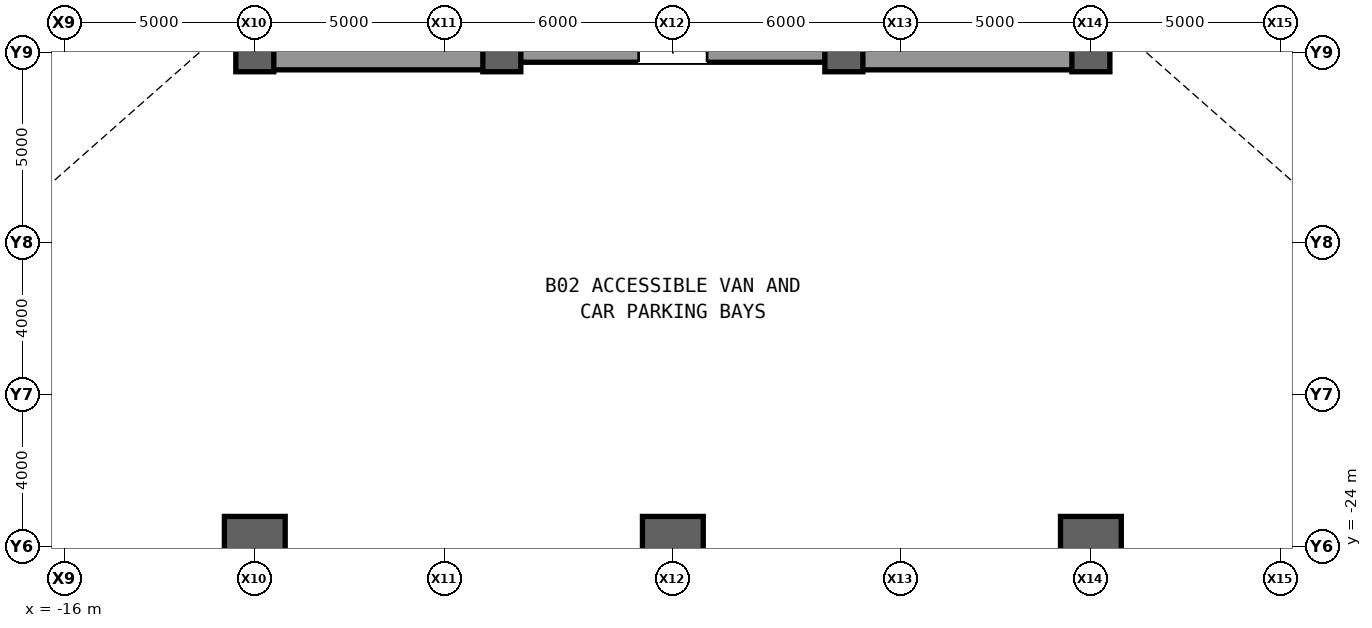
"""IFC4 building model, lengths in metres.
Left out: names, types, materials, properties, quantities, classifications, styles, units other than length and angle.
Written with IfcOpenShell. Run it as: python <this file> out.ifc"""

import sys

from ifc_helpers import new_model, si_unit, direction, frame, frame_2d, origin, origin_2d, place, context, subcontext, project, spatial, rectangle, extrude, source, transform, mapped, element, fill, save


model = new_model("IFC4")
c1 = context("Model", 3, precision=1e-05, world=origin(), true_north=direction((0.0, 1.0)))
c2 = subcontext(c1, "Body", "Model", "MODEL_VIEW")
j1 = project(units=[si_unit("LENGTHUNIT", "METRE"), si_unit("PLANEANGLEUNIT", "RADIAN")], contexts=[c1])
p1 = place(None, origin())
s1 = spatial("IfcSite", under=j1, at=p1, CompositionType="ELEMENT")
p2 = place(p1, origin())
s2 = spatial("IfcBuilding", under=s1, at=p2, CompositionType="ELEMENT")
p3 = place(p2, frame((0.0, 0.0, -9.6)))
s3 = spatial("IfcBuildingStorey", under=s2, at=p3, CompositionType="ELEMENT", Elevation=-9.6)
m1 = source(origin(), c2, "Body", "SweptSolid", [
    extrude(rectangle(XDim=22.0, YDim=0.6, at=frame_2d((11.0, 0.0))), origin(), (0.0, 0.0, 1.0), 4.48),
])
p4 = place(p3, frame((-11.0, -11.0, 0.0), z_axis=(0.0, 0.0, 1.0), x_axis=(0.0, 1.0, 0.0)))
e1 = element("IfcWall", 1, at=p4, inside=s3, PredefinedType="SHEAR", context=c2, shape_type="MappedRepresentation", body=[
    mapped(m1, transform((0.0, 0.0, 0.0), scale=1.0)),
])
m2 = source(origin(), c2, "Body", "SweptSolid", [
    extrude(rectangle(XDim=1.1, YDim=2.2, at=frame_2d((0.55, 1.1))), frame((0.0, 0.31, 0.0), z_axis=(0.0, -1.0, 0.0), x_axis=(1.0, 0.0, 0.0)), (0.0, 0.0, 1.0), 0.62),
])
p5 = place(p4, frame((0.8, 0.0, 0.0)))
e2 = element("IfcOpeningElement", 2, at=p5, cuts=e1, PredefinedType="OPENING", context=c2, shape_type="MappedRepresentation", body=[
    mapped(m2, transform((0.0, 0.0, 0.0), scale=1.0)),
])
p6 = place(p4, frame((12.5, 0.0, 0.0)))
e3 = element("IfcOpeningElement", 3, at=p6, cuts=e1, PredefinedType="OPENING", context=c2, shape_type="MappedRepresentation", body=[
    mapped(m2, transform((0.0, 0.0, 0.0), scale=1.0)),
])
m3 = source(origin(), c2, "Body", "SweptSolid", [
    extrude(rectangle(XDim=0.9, YDim=2.15, at=frame_2d((0.45, 1.075))), frame((0.0, 0.31, 0.0), z_axis=(0.0, -1.0, 0.0), x_axis=(1.0, 0.0, 0.0)), (0.0, 0.0, 1.0), 0.62),
])
p7 = place(p4, frame((6.2, 0.0, 0.0)))
e4 = element("IfcOpeningElement", 4, at=p7, cuts=e1, PredefinedType="OPENING", context=c2, shape_type="MappedRepresentation", body=[
    mapped(m3, transform((0.0, 0.0, 0.0), scale=1.0)),
])
p8 = place(p4, frame((8.525, 0.0, 0.0)))
e5 = element("IfcOpeningElement", 5, at=p8, cuts=e1, PredefinedType="OPENING", context=c2, shape_type="MappedRepresentation", body=[
    mapped(m3, transform((0.0, 0.0, 0.0), scale=1.0)),
])
m4 = source(origin(), c2, "Body", "SweptSolid", [
    extrude(rectangle(XDim=1.3, YDim=2.3, at=frame_2d((0.65, 1.15))), frame((0.0, 0.31, 0.0), z_axis=(0.0, -1.0, 0.0), x_axis=(1.0, 0.0, 0.0)), (0.0, 0.0, 1.0), 0.62),
])
p9 = place(p4, frame((2.7, 0.0, 0.0)))
e6 = element("IfcOpeningElement", 6, at=p9, cuts=e1, PredefinedType="OPENING", context=c2, shape_type="MappedRepresentation", body=[
    mapped(m4, transform((0.0, 0.0, 0.0), scale=1.0)),
])
p10 = place(p3, frame((11.0, -11.0, 0.0), z_axis=(0.0, 0.0, 1.0), x_axis=(0.0, 1.0, 0.0)))
e7 = element("IfcWall", 7, at=p10, inside=s3, PredefinedType="SHEAR", context=c2, shape_type="MappedRepresentation", body=[
    mapped(m1, transform((0.0, 0.0, 0.0), scale=1.0)),
])
p11 = place(p10, frame((0.8, 0.0, 0.0)))
e8 = element("IfcOpeningElement", 8, at=p11, cuts=e7, PredefinedType="OPENING", context=c2, shape_type="MappedRepresentation", body=[
    mapped(m2, transform((0.0, 0.0, 0.0), scale=1.0)),
])
p12 = place(p10, frame((6.2, 0.0, 0.0)))
e9 = element("IfcOpeningElement", 9, at=p12, cuts=e7, PredefinedType="OPENING", context=c2, shape_type="MappedRepresentation", body=[
    mapped(m3, transform((0.0, 0.0, 0.0), scale=1.0)),
])
p13 = place(p10, frame((8.525, 0.0, 0.0)))
e10 = element("IfcOpeningElement", 10, at=p13, cuts=e7, PredefinedType="OPENING", context=c2, shape_type="MappedRepresentation", body=[
    mapped(m3, transform((0.0, 0.0, 0.0), scale=1.0)),
])
p14 = place(p10, frame((2.7, 0.0, 0.0)))
e11 = element("IfcOpeningElement", 11, at=p14, cuts=e7, PredefinedType="OPENING", context=c2, shape_type="MappedRepresentation", body=[
    mapped(m4, transform((0.0, 0.0, 0.0), scale=1.0)),
])
p15 = place(p10, frame((13.35, 0.0, 0.0)))
e12 = element("IfcOpeningElement", 12, at=p15, cuts=e7, PredefinedType="OPENING", context=c2, shape_type="MappedRepresentation", body=[
    mapped(m4, transform((0.0, 0.0, 0.0), scale=1.0)),
])
m5 = source(origin(), c2, "Body", "SweptSolid", [
    extrude(rectangle(XDim=5.85, YDim=0.9, at=frame_2d((2.925, 0.0))), origin(), (0.0, 0.0, 1.0), 4.48),
])
for number, where, z_axis, x_axis in (
    (13, (-10.7, -11.0, 0.0), (0.0, 0.0, 1.0), (1.0, 0.0, 0.0)),
    (14, (4.85, -11.0, 0.0), (0.0, 0.0, 1.0), (1.0, 0.0, 0.0)),
):
    element("IfcWall", number, at=place(p3, frame(where, z_axis=z_axis, x_axis=x_axis)), inside=s3, PredefinedType="SHEAR", context=c2, shape_type="MappedRepresentation", body=[
        mapped(m5, transform((0.0, 0.0, 0.0), scale=1.0)),
    ])
m6 = source(origin(), c2, "Body", "SweptSolid", [
    extrude(rectangle(XDim=9.2, YDim=0.5, at=frame_2d((4.6, 0.0))), origin(), (0.0, 0.0, 1.0), 4.48),
])
p16 = place(p3, frame((-4.6, -11.0, 0.0), z_axis=(0.0, 0.0, 1.0), x_axis=(1.0, 0.0, 0.0)))
e15 = element("IfcWall", 15, at=p16, inside=s3, PredefinedType="SHEAR", context=c2, shape_type="MappedRepresentation", body=[
    mapped(m6, transform((0.0, 0.0, 0.0), scale=1.0)),
])
m7 = source(origin(), c2, "Body", "SweptSolid", [
    extrude(rectangle(XDim=1.8, YDim=2.25, at=frame_2d((0.9, 1.125))), frame((0.0, 0.26, 0.0), z_axis=(0.0, -1.0, 0.0), x_axis=(1.0, 0.0, 0.0)), (0.0, 0.0, 1.0), 0.52),
])
p17 = place(p16, frame((3.7, 0.0, 0.0)))
e16 = element("IfcOpeningElement", 16, at=p17, cuts=e15, PredefinedType="OPENING", context=c2, shape_type="MappedRepresentation", body=[
    mapped(m7, transform((0.0, 0.0, 0.0), scale=1.0)),
])
m8 = source(origin(), c2, "Body", "SweptSolid", [
    extrude(rectangle(XDim=1.6, YDim=1.6, at=origin_2d()), origin(), (0.0, 0.0, 1.0), 4.8),
])
p18 = place(p3, frame((-11.0, -24.0, 0.0), z_axis=(0.0, 0.0, 1.0), x_axis=(1.0, 0.0, 0.0)))
e17 = element("IfcColumn", 17, at=p18, inside=s3, PredefinedType="COLUMN", context=c2, shape_type="MappedRepresentation", body=[
    mapped(m8, transform((0.0, 0.0, 0.0), scale=1.0)),
])
m9 = source(origin(), c2, "Body", "SweptSolid", [
    extrude(rectangle(XDim=1.0, YDim=1.0, at=origin_2d()), origin(), (0.0, 0.0, 1.0), 4.8),
])
for number, where, z_axis, x_axis in (
    (18, (-11.0, -11.0, 0.0), (0.0, 0.0, 1.0), (1.0, 0.0, 0.0)),
    (19, (-4.5, -11.0, 0.0), (0.0, 0.0, 1.0), (1.0, 0.0, 0.0)),
):
    element("IfcColumn", number, at=place(p3, frame(where, z_axis=z_axis, x_axis=x_axis)), inside=s3, PredefinedType="COLUMN", context=c2, shape_type="MappedRepresentation", body=[
        mapped(m9, transform((0.0, 0.0, 0.0), scale=1.0)),
    ])
p19 = place(p3, frame((0.0, -24.0, 0.0), z_axis=(0.0, 0.0, 1.0), x_axis=(1.0, 0.0, 0.0)))
e20 = element("IfcColumn", 20, at=p19, inside=s3, PredefinedType="COLUMN", context=c2, shape_type="MappedRepresentation", body=[
    mapped(m8, transform((0.0, 0.0, 0.0), scale=1.0)),
])
p20 = place(p3, frame((4.5, -11.0, 0.0), z_axis=(0.0, 0.0, 1.0), x_axis=(1.0, 0.0, 0.0)))
e21 = element("IfcColumn", 21, at=p20, inside=s3, PredefinedType="COLUMN", context=c2, shape_type="MappedRepresentation", body=[
    mapped(m9, transform((0.0, 0.0, 0.0), scale=1.0)),
])
p21 = place(p3, frame((11.0, -24.0, 0.0), z_axis=(0.0, 0.0, 1.0), x_axis=(1.0, 0.0, 0.0)))
e22 = element("IfcColumn", 22, at=p21, inside=s3, PredefinedType="COLUMN", context=c2, shape_type="MappedRepresentation", body=[
    mapped(m8, transform((0.0, 0.0, 0.0), scale=1.0)),
])
p22 = place(p3, frame((11.0, -11.0, 0.0), z_axis=(0.0, 0.0, 1.0), x_axis=(1.0, 0.0, 0.0)))
e23 = element("IfcColumn", 23, at=p22, inside=s3, PredefinedType="COLUMN", context=c2, shape_type="MappedRepresentation", body=[
    mapped(m9, transform((0.0, 0.0, 0.0), scale=1.0)),
])
m10 = source(origin(), c2, "Body", "SweptSolid", [
    extrude(rectangle(XDim=1.8, YDim=2.25, at=frame_2d((0.9, 1.125))), frame((0.0, 0.025, 0.0), z_axis=(0.0, -1.0, 0.0), x_axis=(1.0, 0.0, 0.0)), (0.0, 0.0, 1.0), 0.05),
])
p23 = place(p17, origin())
e24 = element("IfcDoor", 24, at=p23, inside=s3, OperationType="SINGLE_SWING_LEFT", PredefinedType="DOOR", context=c2, shape_type="MappedRepresentation", body=[
    mapped(m10, transform((0.0, 0.0, 0.0), scale=1.0)),
])
fill(e16, e24)
save(model, sys.argv[1])
